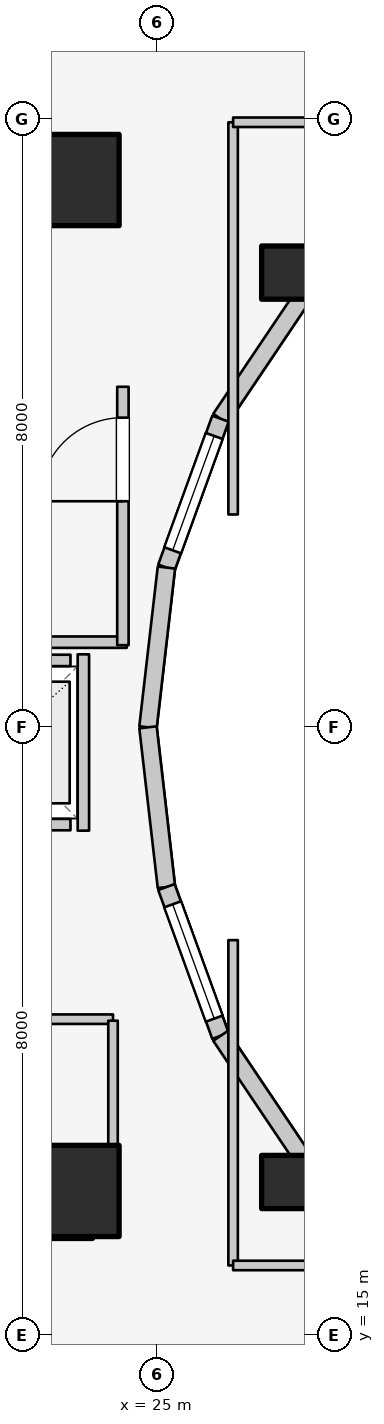
"""IFC4 building model, lengths in metres.
Left out: names, types, materials, properties, quantities, classifications, styles, units other than length and angle.
Written with IfcOpenShell. Run it as: python <this file> out.ifc"""

import sys

from ifc_helpers import new_model, si_unit, direction, frame, frame_2d, origin, origin_2d, place, context, subcontext, project, spatial, rectangle, extrude, element, fill, save


model = new_model("IFC4")
c1 = context("Model", 3, precision=1e-05, world=origin(), true_north=direction((0.0, 1.0)))
c2 = subcontext(c1, "Body", "Model", "MODEL_VIEW")
j1 = project(units=[si_unit("LENGTHUNIT", "METRE"), si_unit("PLANEANGLEUNIT", "RADIAN")], contexts=[c1])
p1 = place(None, origin())
s1 = spatial("IfcSite", under=j1, at=p1, CompositionType="ELEMENT")
p2 = place(p1, origin())
s2 = spatial("IfcBuilding", under=s1, at=p2, CompositionType="ELEMENT")
p3 = place(p2, frame((0.0, 0.0, 204.7)))
s3 = spatial("IfcBuildingStorey", under=s2, at=p3, CompositionType="ELEMENT", Elevation=204.7)
for number, where, z_axis, x_axis in (
    (1, (19.65, 16.55, 0.0), (0.0, 0.0, 1.0), (1.0, 0.0, 0.0)),
    (2, (19.65, 30.35, 0.0), (0.0, 0.0, 1.0), (1.0, 0.0, 0.0)),
):
    element("IfcWall", number, at=place(p3, frame(where, z_axis=z_axis, x_axis=x_axis)), inside=s3, PredefinedType="SHEAR", context=c2, shape_type="SweptSolid", body=[
        extrude(rectangle(XDim=4.5, YDim=0.55, at=frame_2d((2.25, 0.0))), origin(), (0.0, 0.0, 1.0), 3.1),
    ])
for number, where, z_axis, x_axis in (
    (3, (23.9, 16.9, 0.0), (0.0, 0.0, 1.0), (1.0, 0.0, 0.0)),
    (4, (23.9, 30.2, 0.0), (0.0, 0.0, 1.0), (1.0, 0.0, 0.0)),
):
    element("IfcColumn", number, at=place(p3, frame(where, z_axis=z_axis, x_axis=x_axis)), inside=s3, PredefinedType="COLUMN", context=c2, shape_type="SweptSolid", body=[
        extrude(rectangle(XDim=1.2, YDim=1.2, at=origin_2d()), origin(), (0.0, 0.0, 1.0), 3.1),
    ])
for number, where, z_axis, x_axis in (
    (5, (26.725, 28.982, 0.0), (0.0, 0.0, 1.0), (1.0, 0.0, 0.0)),
    (6, (26.725, 17.018, 0.0), (0.0, 0.0, 1.0), (1.0, 0.0, 0.0)),
):
    element("IfcColumn", number, at=place(p3, frame(where, z_axis=z_axis, x_axis=x_axis)), inside=s3, PredefinedType="COLUMN", context=c2, shape_type="SweptSolid", body=[
        extrude(rectangle(XDim=0.7, YDim=0.7, at=origin_2d()), origin(), (0.0, 0.0, 1.0), 3.1),
    ])
p4 = place(p3, frame((28.44, 30.032, 0.0), z_axis=(0.0, 0.0, 1.0), x_axis=(-0.752576694707, -0.658504607869, 0.0)))
e7 = element("IfcWall", 7, at=p4, inside=s3, PredefinedType="STANDARD", context=c2, shape_type="SweptSolid", body=[
    extrude(rectangle(XDim=1.959, YDim=0.23, at=frame_2d((0.98, 0.0))), origin(), (0.0, 0.0, 1.0), 2.16),
])
p5 = place(p3, frame((26.965, 28.742, 0.0), z_axis=(0.0, 0.0, 1.0), x_axis=(-0.558197800898, -0.829707909492, 0.0)))
e8 = element("IfcWall", 8, at=p5, inside=s3, PredefinedType="STANDARD", context=c2, shape_type="SweptSolid", body=[
    extrude(rectangle(XDim=2.027, YDim=0.23, at=frame_2d((1.013, 0.0))), origin(), (0.0, 0.0, 1.0), 2.16),
])
p6 = place(p3, frame((25.834, 27.06, 0.0), z_axis=(0.0, 0.0, 1.0), x_axis=(-0.341423187295, -0.93990968033, 0.0)))
e9 = element("IfcWall", 9, at=p6, inside=s3, PredefinedType="STANDARD", context=c2, shape_type="SweptSolid", body=[
    extrude(rectangle(XDim=2.084, YDim=0.23, at=frame_2d((1.042, 0.0))), origin(), (0.0, 0.0, 1.0), 2.84),
])
p7 = place(p6, frame((0.242, 0.0, 0.85)))
e10 = element("IfcOpeningElement", 10, at=p7, cuts=e9, PredefinedType="OPENING", context=c2, shape_type="SweptSolid", body=[
    extrude(rectangle(XDim=1.6, YDim=1.65, at=frame_2d((0.8, 0.825))), frame((0.0, 0.125, 0.0), z_axis=(0.0, -1.0, 0.0), x_axis=(1.0, 0.0, 0.0)), (0.0, 0.0, 1.0), 0.25),
])
for number, where, z_axis, x_axis in (
    (11, (25.123, 25.102, 0.0), (0.0, 0.0, 1.0), (-0.115, -0.993, 0.0)),
    (12, (24.88, 23.0, 0.0), (0.0, 0.0, 1.0), (0.115, -0.993, 0.0)),
):
    element("IfcWall", number, at=place(p3, frame(where, z_axis=z_axis, x_axis=x_axis)), inside=s3, PredefinedType="STANDARD", context=c2, shape_type="SweptSolid", body=[
        extrude(rectangle(XDim=2.115, YDim=0.23, at=frame_2d((1.058, 0.0))), origin(), (0.0, 0.0, 1.0), 2.84),
    ])
p8 = place(p3, frame((25.123, 20.898, 0.0), z_axis=(0.0, 0.0, 1.0), x_axis=(0.341423187295, -0.93990968033, 0.0)))
e13 = element("IfcWall", 13, at=p8, inside=s3, PredefinedType="STANDARD", context=c2, shape_type="SweptSolid", body=[
    extrude(rectangle(XDim=2.084, YDim=0.23, at=frame_2d((1.042, 0.0))), origin(), (0.0, 0.0, 1.0), 2.84),
])
p9 = place(p8, frame((0.242, 0.0, 0.85)))
e14 = element("IfcOpeningElement", 14, at=p9, cuts=e13, PredefinedType="OPENING", context=c2, shape_type="SweptSolid", body=[
    extrude(rectangle(XDim=1.6, YDim=1.65, at=frame_2d((0.8, 0.825))), frame((0.0, 0.125, 0.0), z_axis=(0.0, -1.0, 0.0), x_axis=(1.0, 0.0, 0.0)), (0.0, 0.0, 1.0), 0.25),
])
p10 = place(p3, frame((25.834, 18.94, 0.0), z_axis=(0.0, 0.0, 1.0), x_axis=(0.558197800898, -0.829707909492, 0.0)))
e15 = element("IfcWall", 15, at=p10, inside=s3, PredefinedType="STANDARD", context=c2, shape_type="SweptSolid", body=[
    extrude(rectangle(XDim=2.027, YDim=0.23, at=frame_2d((1.013, 0.0))), origin(), (0.0, 0.0, 1.0), 2.16),
])
p11 = place(p3, frame((26.965, 17.258, 0.0), z_axis=(0.0, 0.0, 1.0), x_axis=(0.752576694707, -0.658504607869, 0.0)))
e16 = element("IfcWall", 16, at=p11, inside=s3, PredefinedType="STANDARD", context=c2, shape_type="SweptSolid", body=[
    extrude(rectangle(XDim=1.959, YDim=0.23, at=frame_2d((0.98, 0.0))), origin(), (0.0, 0.0, 1.0), 2.16),
])
p12 = place(p3, frame((22.04, 21.72, 0.0), z_axis=(0.0, 0.0, 1.0), x_axis=(1.0, 0.0, 0.0)))
e17 = element("IfcWall", 17, at=p12, inside=s3, PredefinedType="SOLIDWALL", context=c2, shape_type="SweptSolid", body=[
    extrude(rectangle(XDim=1.82, YDim=0.15, at=frame_2d((0.91, 0.0))), origin(), (0.0, 0.0, 1.0), 2.12),
])
p13 = place(p12, frame((0.36, 0.0, 0.0)))
e18 = element("IfcOpeningElement", 18, at=p13, cuts=e17, PredefinedType="OPENING", context=c2, shape_type="SweptSolid", body=[
    extrude(rectangle(XDim=1.1, YDim=2.1, at=frame_2d((0.55, 1.05))), frame((0.0, 0.085, 0.0), z_axis=(0.0, -1.0, 0.0), x_axis=(1.0, 0.0, 0.0)), (0.0, 0.0, 1.0), 0.17),
])
p14 = place(p3, frame((22.04, 23.88, 0.0), z_axis=(0.0, 0.0, 1.0), x_axis=(1.0, 0.0, 0.0)))
e19 = element("IfcWall", 19, at=p14, inside=s3, PredefinedType="SOLIDWALL", context=c2, shape_type="SweptSolid", body=[
    extrude(rectangle(XDim=1.82, YDim=0.15, at=frame_2d((0.91, 0.0))), origin(), (0.0, 0.0, 1.0), 2.12),
])
p15 = place(p3, frame((24.03, 21.64, 0.0), z_axis=(0.0, 0.0, 1.0), x_axis=(0.0, 1.0, 0.0)))
e20 = element("IfcWall", 20, at=p15, inside=s3, PredefinedType="SOLIDWALL", context=c2, shape_type="SweptSolid", body=[
    extrude(rectangle(XDim=2.32, YDim=0.15, at=frame_2d((1.16, 0.0))), origin(), (0.0, 0.0, 1.0), 2.12),
])
p16 = place(p3, frame((19.52, 24.12, 0.0), z_axis=(0.0, 0.0, 1.0), x_axis=(1.0, 0.0, 0.0)))
e21 = element("IfcWall", 21, at=p16, inside=s3, PredefinedType="PARTITIONING", context=c2, shape_type="SweptSolid", body=[
    extrude(rectangle(XDim=5.08, YDim=0.15, at=frame_2d((2.54, 0.0))), origin(), (0.0, 0.0, 1.0), 2.12),
])
p17 = place(p3, frame((24.55, 24.08, 0.0), z_axis=(0.0, 0.0, 1.0), x_axis=(0.0, 1.0, 0.0)))
e22 = element("IfcWall", 22, at=p17, inside=s3, PredefinedType="PARTITIONING", context=c2, shape_type="SweptSolid", body=[
    extrude(rectangle(XDim=3.4, YDim=0.15, at=frame_2d((1.7, 0.0))), origin(), (0.0, 0.0, 1.0), 2.855),
])
p18 = place(p17, frame((1.894, 0.0, 0.0)))
e23 = element("IfcOpeningElement", 23, at=p18, cuts=e22, PredefinedType="OPENING", context=c2, shape_type="SweptSolid", body=[
    extrude(rectangle(XDim=1.1, YDim=2.1, at=frame_2d((0.55, 1.05))), frame((0.0, 0.085, 0.0), z_axis=(0.0, -1.0, 0.0), x_axis=(1.0, 0.0, 0.0)), (0.0, 0.0, 1.0), 0.17),
])
p19 = place(p3, frame((19.55, 19.16, 0.0), z_axis=(0.0, 0.0, 1.0), x_axis=(1.0, 0.0, 0.0)))
e24 = element("IfcWall", 24, at=p19, inside=s3, PredefinedType="PARTITIONING", context=c2, shape_type="SweptSolid", body=[
    extrude(rectangle(XDim=4.87, YDim=0.125, at=frame_2d((2.435, 0.0))), origin(), (0.0, 0.0, 1.0), 2.12),
])
p20 = place(p19, frame((2.272, 0.0, 0.0)))
e25 = element("IfcOpeningElement", 25, at=p20, cuts=e24, PredefinedType="OPENING", context=c2, shape_type="SweptSolid", body=[
    extrude(rectangle(XDim=0.85, YDim=2.05, at=frame_2d((0.425, 1.025))), frame((0.0, 0.073, 0.0), z_axis=(0.0, -1.0, 0.0), x_axis=(1.0, 0.0, 0.0)), (0.0, 0.0, 1.0), 0.145),
])
p21 = place(p3, frame((24.42, 17.1, 0.0), z_axis=(0.0, 0.0, 1.0), x_axis=(0.0, 1.0, 0.0)))
e26 = element("IfcWall", 26, at=p21, inside=s3, PredefinedType="PARTITIONING", context=c2, shape_type="SweptSolid", body=[
    extrude(rectangle(XDim=2.04, YDim=0.125, at=frame_2d((1.02, 0.0))), origin(), (0.0, 0.0, 1.0), 2.232),
])
p22 = place(p3, frame((28.45, 30.015, 0.0), z_axis=(0.0, 0.0, 1.0), x_axis=(-0.523992004803, 0.851723182086, 0.0)))
e27 = element("IfcWall", 27, at=p22, inside=s3, PredefinedType="PARTITIONING", context=c2, shape_type="SweptSolid", body=[
    extrude(rectangle(XDim=3.101, YDim=0.125, at=frame_2d((1.551, 0.0))), origin(), (0.0, 0.0, 1.0), 2.376),
])
p23 = place(p3, frame((26.0, 25.8, 0.0), z_axis=(0.0, 0.0, 1.0), x_axis=(0.0, 1.0, 0.0)))
e28 = element("IfcWall", 28, at=p23, inside=s3, PredefinedType="PARTITIONING", context=c2, shape_type="SweptSolid", body=[
    extrude(rectangle(XDim=5.16, YDim=0.125, at=frame_2d((2.58, 0.0))), origin(), (0.0, 0.0, 1.0), 2.232),
])
p24 = place(p3, frame((26.0, 30.96, 0.0), z_axis=(0.0, 0.0, 1.0), x_axis=(1.0, 0.0, 0.0)))
e29 = element("IfcWall", 29, at=p24, inside=s3, PredefinedType="PARTITIONING", context=c2, shape_type="SweptSolid", body=[
    extrude(rectangle(XDim=2.6, YDim=0.125, at=frame_2d((1.3, 0.0))), origin(), (0.0, 0.0, 1.0), 2.376),
])
p25 = place(p3, frame((26.0, 15.92, 0.0), z_axis=(0.0, 0.0, 1.0), x_axis=(0.0, 1.0, 0.0)))
e30 = element("IfcWall", 30, at=p25, inside=s3, PredefinedType="PARTITIONING", context=c2, shape_type="SweptSolid", body=[
    extrude(rectangle(XDim=4.28, YDim=0.125, at=frame_2d((2.14, 0.0))), origin(), (0.0, 0.0, 1.0), 2.232),
])
p26 = place(p3, frame((26.0, 15.92, 0.0), z_axis=(0.0, 0.0, 1.0), x_axis=(1.0, 0.0, 0.0)))
e31 = element("IfcWall", 31, at=p26, inside=s3, PredefinedType="PARTITIONING", context=c2, shape_type="SweptSolid", body=[
    extrude(rectangle(XDim=2.6, YDim=0.125, at=frame_2d((1.3, 0.0))), origin(), (0.0, 0.0, 1.0), 2.232),
])
p27 = place(p7, origin())
e32 = element("IfcWindow", 32, at=p27, inside=s3, PartitioningType="SINGLE_PANEL", PredefinedType="WINDOW", context=c2, shape_type="SweptSolid", body=[
    extrude(rectangle(XDim=1.6, YDim=1.65, at=frame_2d((0.8, 0.825))), frame((0.0, 0.03, 0.0), z_axis=(0.0, -1.0, 0.0), x_axis=(1.0, 0.0, 0.0)), (0.0, 0.0, 1.0), 0.06),
])
fill(e10, e32)
p28 = place(p9, origin())
e33 = element("IfcWindow", 33, at=p28, inside=s3, PartitioningType="SINGLE_PANEL", PredefinedType="WINDOW", context=c2, shape_type="SweptSolid", body=[
    extrude(rectangle(XDim=1.6, YDim=1.65, at=frame_2d((0.8, 0.825))), frame((0.0, 0.03, 0.0), z_axis=(0.0, -1.0, 0.0), x_axis=(1.0, 0.0, 0.0)), (0.0, 0.0, 1.0), 0.06),
])
fill(e14, e33)
p29 = place(p18, origin())
e34 = element("IfcDoor", 34, at=p29, inside=s3, OperationType="SINGLE_SWING_LEFT", PredefinedType="DOOR", context=c2, shape_type="SweptSolid", body=[
    extrude(rectangle(XDim=1.1, YDim=2.1, at=frame_2d((0.55, 1.05))), frame((0.0, 0.025, 0.0), z_axis=(0.0, -1.0, 0.0), x_axis=(1.0, 0.0, 0.0)), (0.0, 0.0, 1.0), 0.05),
])
fill(e23, e34)
save(model, sys.argv[1])
